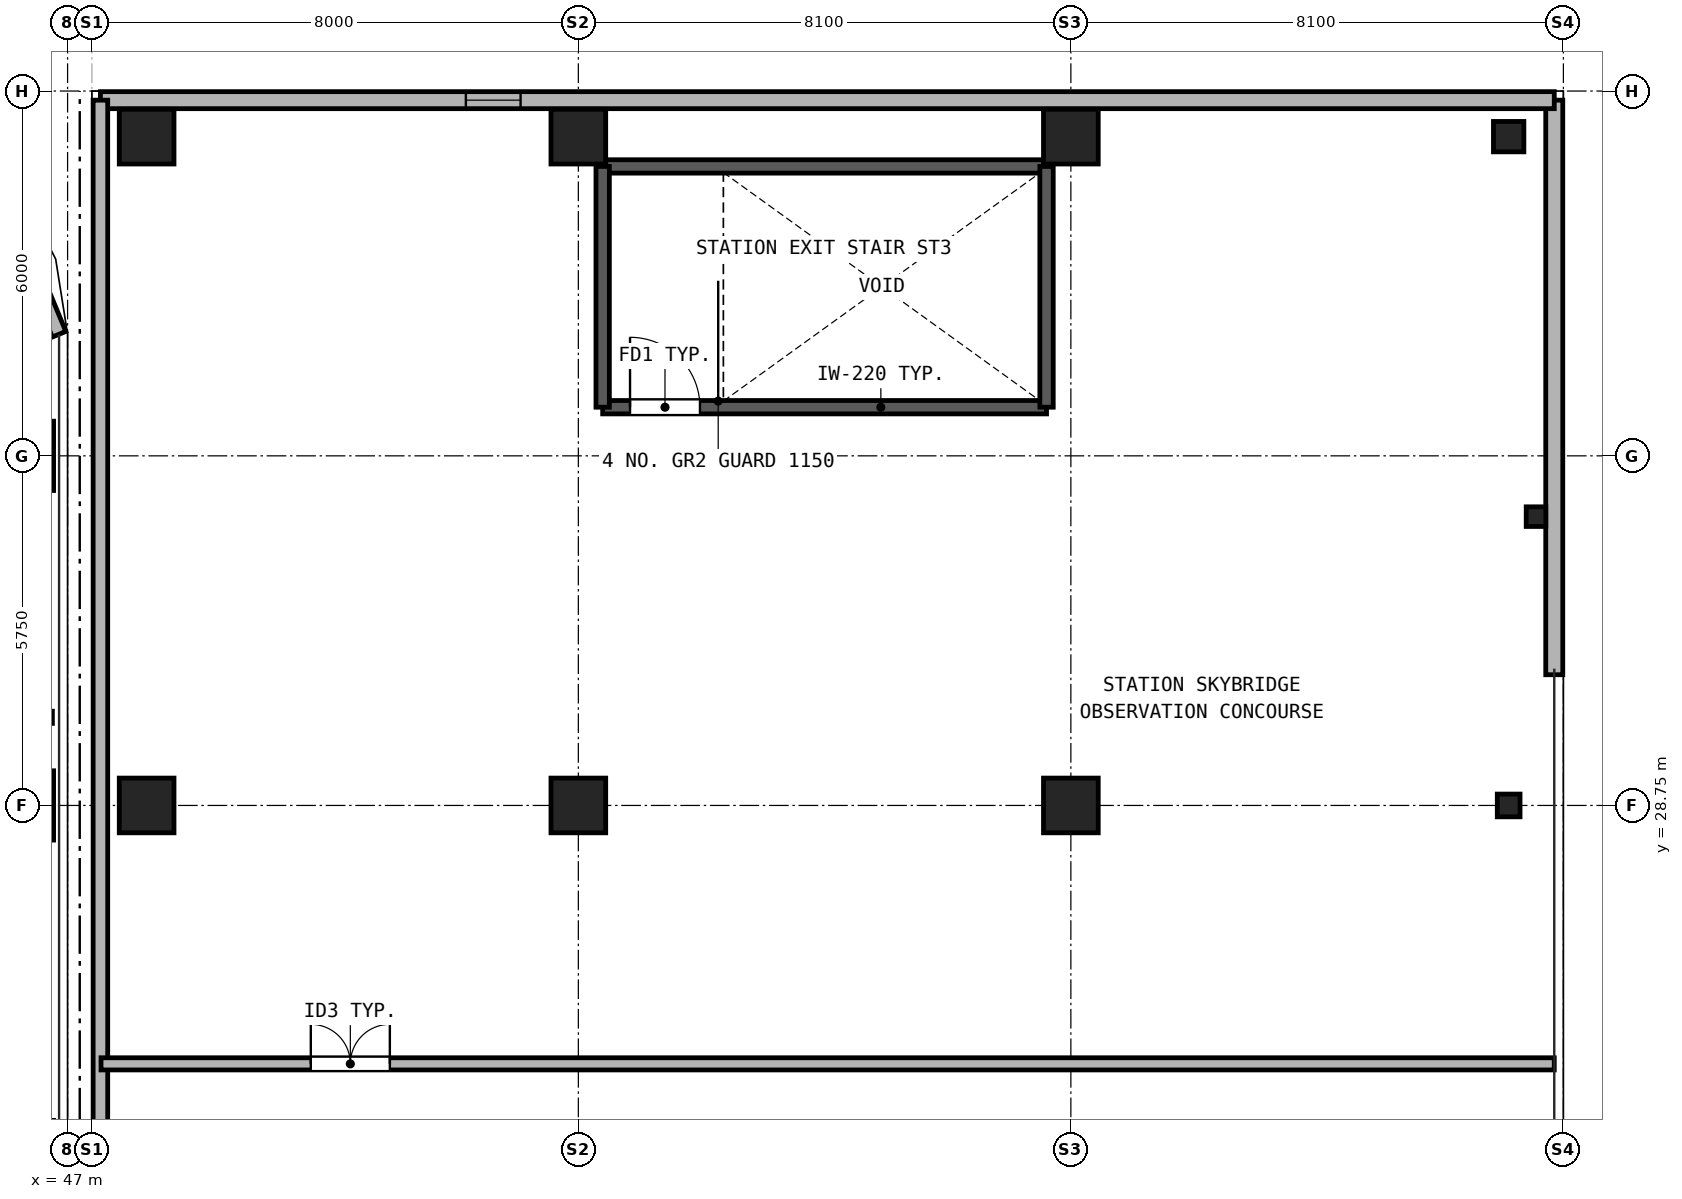
"""IFC4 building model, lengths in metres.
Left out: names, types, materials, properties, quantities, classifications, styles, units other than length and angle.
Written with IfcOpenShell. Run it as: python <this file> out.ifc"""

import sys

from ifc_helpers import new_model, si_unit, direction, frame, frame_2d, origin, origin_2d, place, context, subcontext, project, spatial, rectangle, hollow_rectangle, i_section, extrude, source, transform, mapped, element, fill, save


model = new_model("IFC4")
c1 = context("Model", 3, precision=1e-05, world=origin(), true_north=direction((0.0, 1.0)))
c2 = subcontext(c1, "Body", "Model", "MODEL_VIEW")
j1 = project(units=[si_unit("LENGTHUNIT", "METRE"), si_unit("PLANEANGLEUNIT", "RADIAN")], contexts=[c1])
p1 = place(None, origin())
s1 = spatial("IfcSite", under=j1, at=p1, CompositionType="ELEMENT")
p2 = place(p1, origin())
s2 = spatial("IfcBuilding", under=s1, at=p2, CompositionType="ELEMENT")
p3 = place(p2, frame((0.0, 0.0, 18.0)))
s3 = spatial("IfcBuildingStorey", under=s2, at=p3, CompositionType="ELEMENT", Elevation=18.0)
m1 = source(origin(), c2, "Body", "SweptSolid", [
    extrude(hollow_rectangle(XDim=1.14, YDim=1.14, WallThickness=0.07, at=origin_2d()), origin(), (0.0, 0.0, 1.0), 4.14),
])
for number, where, z_axis, x_axis in (
    (1, (46.2, 28.75, 0.0), (0.0, 0.0, 1.0), (1.0, 0.0, 0.0)),
    (2, (46.2, 34.5, 0.0), (0.0, 0.0, 1.0), (1.0, 0.0, 0.0)),
):
    element("IfcColumn", number, at=place(p3, frame(where, z_axis=z_axis, x_axis=x_axis)), inside=s3, PredefinedType="COLUMN", context=c2, shape_type="MappedRepresentation", body=[
        mapped(m1, transform((0.0, 0.0, 0.0), x_axis=(1.0, 0.0, 0.0), y_axis=(0.0, 1.0, 0.0), z_axis=(0.0, 0.0, 1.0), scale=1.0)),
    ])
m2 = source(origin(), c2, "Body", "SweptSolid", [
    extrude(hollow_rectangle(XDim=0.7, YDim=0.9, WallThickness=0.04, at=origin_2d()), origin(), (0.0, 0.0, 1.0), 4.2),
])
for number, where, z_axis, x_axis in (
    (3, (48.3, 28.75, 0.0), (0.0, 0.0, 1.0), (1.0, 0.0, 0.0)),
    (4, (48.3, 39.75, 0.0), (0.0, 0.0, 1.0), (1.0, 0.0, 0.0)),
    (5, (55.4, 28.75, 0.0), (0.0, 0.0, 1.0), (1.0, 0.0, 0.0)),
    (6, (55.4, 39.75, 0.0), (0.0, 0.0, 1.0), (1.0, 0.0, 0.0)),
    (7, (63.5, 28.75, 0.0), (0.0, 0.0, 1.0), (1.0, 0.0, 0.0)),
    (8, (63.5, 39.75, 0.0), (0.0, 0.0, 1.0), (1.0, 0.0, 0.0)),
):
    element("IfcColumn", number, at=place(p3, frame(where, z_axis=z_axis, x_axis=x_axis)), inside=s3, PredefinedType="COLUMN", context=c2, shape_type="MappedRepresentation", body=[
        mapped(m2, transform((0.0, 0.0, 0.0), x_axis=(1.0, 0.0, 0.0), y_axis=(0.0, 1.0, 0.0), z_axis=(0.0, 0.0, 1.0), scale=1.0)),
    ])
m3 = source(origin(), c2, "Body", "SweptSolid", [
    extrude(i_section(OverallWidth=0.374, OverallDepth=0.372, WebThickness=0.016, FlangeThickness=0.026, at=origin_2d()), origin(), (0.0, 0.0, 1.0), 4.2),
])
p4 = place(p3, frame((70.7, 28.75, 0.0), z_axis=(0.0, 0.0, 1.0), x_axis=(1.0, 0.0, 0.0)))
e9 = element("IfcColumn", 9, at=p4, inside=s3, PredefinedType="COLUMN", context=c2, shape_type="MappedRepresentation", body=[
    mapped(m3, transform((0.0, 0.0, 0.0), x_axis=(1.0, 0.0, 0.0), y_axis=(0.0, 1.0, 0.0), z_axis=(0.0, 0.0, 1.0), scale=1.0)),
])
m4 = source(origin(), c2, "Body", "SweptSolid", [
    extrude(hollow_rectangle(XDim=0.5, YDim=0.5, WallThickness=0.025, at=origin_2d()), origin(), (0.0, 0.0, 1.0), 4.2),
])
p5 = place(p3, frame((70.7, 39.75, 0.0), z_axis=(0.0, 0.0, 1.0), x_axis=(1.0, 0.0, 0.0)))
e10 = element("IfcColumn", 10, at=p5, inside=s3, PredefinedType="COLUMN", context=c2, shape_type="MappedRepresentation", body=[
    mapped(m4, transform((0.0, 0.0, 0.0), x_axis=(1.0, 0.0, 0.0), y_axis=(0.0, 1.0, 0.0), z_axis=(0.0, 0.0, 1.0), scale=1.0)),
])
m5 = source(origin(), c2, "Body", "SweptSolid", [
    extrude(i_section(OverallWidth=0.309, OverallDepth=0.323, WebThickness=0.014, FlangeThickness=0.023, at=origin_2d()), origin(), (0.0, 0.0, 1.0), 4.2),
])
p6 = place(p3, frame((71.15, 33.5, 0.0), z_axis=(0.0, 0.0, 1.0), x_axis=(1.0, 0.0, 0.0)))
e11 = element("IfcColumn", 11, at=p6, inside=s3, PredefinedType="PILASTER", context=c2, shape_type="MappedRepresentation", body=[
    mapped(m5, transform((0.0, 0.0, 0.0), x_axis=(1.0, 0.0, 0.0), y_axis=(0.0, 1.0, 0.0), z_axis=(0.0, 0.0, 1.0), scale=1.0)),
])
p7 = place(p3, frame((46.86, 36.5, 0.0), z_axis=(0.0, 0.0, 1.0), x_axis=(-0.382689947836, 0.923876833688, 0.0)))
e12 = element("IfcWall", 12, at=p7, inside=s3, PredefinedType="SOLIDWALL", context=c2, shape_type="SweptSolid", body=[
    extrude(rectangle(XDim=2.954, YDim=0.24, at=frame_2d((1.477, 0.0))), origin(), (0.0, 0.0, 1.0), 4.14),
])
p8 = place(p3, frame((71.45, 30.9, 0.0), z_axis=(0.0, 0.0, 1.0), x_axis=(0.0, 1.0, 0.0)))
e13 = element("IfcWall", 13, at=p8, inside=s3, PredefinedType="SOLIDWALL", context=c2, shape_type="SweptSolid", body=[
    extrude(rectangle(XDim=9.45, YDim=0.28, at=frame_2d((4.725, 0.0))), origin(), (0.0, 0.0, 1.0), 4.2),
])
p9 = place(p3, frame((47.54, 40.35, 0.0), z_axis=(0.0, 0.0, 1.0), x_axis=(1.0, 0.0, 0.0)))
e14 = element("IfcWall", 14, at=p9, inside=s3, PredefinedType="SOLIDWALL", context=c2, shape_type="SweptSolid", body=[
    extrude(rectangle(XDim=23.91, YDim=0.28, at=frame_2d((11.955, 0.0))), origin(), (0.0, 0.0, 1.0), 4.2),
])
p10 = place(p9, frame((6.01, 0.0, 1.1)))
e15 = element("IfcOpeningElement", 15, at=p10, cuts=e14, PredefinedType="OPENING", context=c2, shape_type="SweptSolid", body=[
    extrude(rectangle(XDim=0.9, YDim=1.5, at=frame_2d((0.45, 0.75))), frame((0.0, 0.15, 0.0), z_axis=(0.0, -1.0, 0.0), x_axis=(1.0, 0.0, 0.0)), (0.0, 0.0, 1.0), 0.3),
])
p11 = place(p3, frame((47.54, -0.54, 0.0), z_axis=(0.0, 0.0, 1.0), x_axis=(0.0, 1.0, 0.0)))
e16 = element("IfcWall", 16, at=p11, inside=s3, PredefinedType="SOLIDWALL", context=c2, shape_type="SweptSolid", body=[
    extrude(rectangle(XDim=40.89, YDim=0.24, at=frame_2d((20.445, 0.0))), origin(), (0.0, 0.0, 1.0), 4.2),
])
p12 = place(p3, frame((55.8, 35.3, 0.0), z_axis=(0.0, 0.0, 1.0), x_axis=(1.0, 0.0, 0.0)))
e17 = element("IfcWall", 17, at=p12, inside=s3, PredefinedType="SOLIDWALL", context=c2, shape_type="SweptSolid", body=[
    extrude(rectangle(XDim=7.3, YDim=0.22, at=frame_2d((3.65, 0.0))), origin(), (0.0, 0.0, 1.0), 4.14),
])
p13 = place(p12, frame((0.45, 0.0, 0.0)))
e18 = element("IfcOpeningElement", 18, at=p13, cuts=e17, PredefinedType="OPENING", context=c2, shape_type="SweptSolid", body=[
    extrude(rectangle(XDim=1.15, YDim=2.2, at=frame_2d((0.575, 1.1))), frame((0.0, 0.12, 0.0), z_axis=(0.0, -1.0, 0.0), x_axis=(1.0, 0.0, 0.0)), (0.0, 0.0, 1.0), 0.24),
])
p14 = place(p3, frame((55.8, 39.26, 0.0), z_axis=(0.0, 0.0, 1.0), x_axis=(1.0, 0.0, 0.0)))
e19 = element("IfcWall", 19, at=p14, inside=s3, PredefinedType="SOLIDWALL", context=c2, shape_type="SweptSolid", body=[
    extrude(rectangle(XDim=7.3, YDim=0.22, at=frame_2d((3.65, 0.0))), origin(), (0.0, 0.0, 1.0), 4.14),
])
for number, where, z_axis, x_axis in (
    (20, (55.8, 35.3, 0.0), (0.0, 0.0, 1.0), (0.0, 1.0, 0.0)),
    (21, (63.1, 35.3, 0.0), (0.0, 0.0, 1.0), (0.0, 1.0, 0.0)),
):
    element("IfcWall", number, at=place(p3, frame(where, z_axis=z_axis, x_axis=x_axis)), inside=s3, PredefinedType="SOLIDWALL", context=c2, shape_type="SweptSolid", body=[
        extrude(rectangle(XDim=3.96, YDim=0.22, at=frame_2d((1.98, 0.0))), origin(), (0.0, 0.0, 1.0), 4.14),
    ])
p15 = place(p3, frame((47.55, 24.5, 0.0), z_axis=(0.0, 0.0, 1.0), x_axis=(1.0, 0.0, 0.0)))
e22 = element("IfcWall", 22, at=p15, inside=s3, PredefinedType="PARTITIONING", context=c2, shape_type="SweptSolid", body=[
    extrude(rectangle(XDim=23.9, YDim=0.2, at=frame_2d((11.95, 0.0))), origin(), (0.0, 0.0, 1.0), 4.14),
])
p16 = place(p15, frame((3.45, 0.0, 0.0)))
e23 = element("IfcOpeningElement", 23, at=p16, cuts=e22, PredefinedType="OPENING", context=c2, shape_type="SweptSolid", body=[
    extrude(rectangle(XDim=1.3, YDim=2.2, at=frame_2d((0.65, 1.1))), frame((0.0, 0.11, 0.0), z_axis=(0.0, -1.0, 0.0), x_axis=(1.0, 0.0, 0.0)), (0.0, 0.0, 1.0), 0.22),
])
p17 = place(p10, origin())
e24 = element("IfcWindow", 24, at=p17, inside=s3, PartitioningType="SINGLE_PANEL", PredefinedType="WINDOW", context=c2, shape_type="SweptSolid", body=[
    extrude(rectangle(XDim=0.9, YDim=1.5, at=frame_2d((0.45, 0.75))), frame((0.0, 0.03, 0.0), z_axis=(0.0, -1.0, 0.0), x_axis=(1.0, 0.0, 0.0)), (0.0, 0.0, 1.0), 0.06),
])
fill(e15, e24)
p18 = place(p13, frame((1.15, 0.0, 0.0), z_axis=(0.0, 0.0, 1.0), x_axis=(-1.0, 0.0, 0.0)))
e25 = element("IfcDoor", 25, at=p18, inside=s3, OperationType="SINGLE_SWING_LEFT", PredefinedType="DOOR", context=c2, shape_type="SweptSolid", body=[
    extrude(rectangle(XDim=1.15, YDim=2.2, at=frame_2d((0.575, 1.1))), frame((0.0, 0.025, 0.0), z_axis=(0.0, -1.0, 0.0), x_axis=(1.0, 0.0, 0.0)), (0.0, 0.0, 1.0), 0.05),
])
fill(e18, e25)
p19 = place(p16, origin())
e26 = element("IfcDoor", 26, at=p19, inside=s3, OperationType="DOUBLE_DOOR_SINGLE_SWING", PredefinedType="DOOR", context=c2, shape_type="SweptSolid", body=[
    extrude(rectangle(XDim=1.3, YDim=2.2, at=frame_2d((0.65, 1.1))), frame((0.0, 0.025, 0.0), z_axis=(0.0, -1.0, 0.0), x_axis=(1.0, 0.0, 0.0)), (0.0, 0.0, 1.0), 0.05),
])
fill(e23, e26)
save(model, sys.argv[1])
